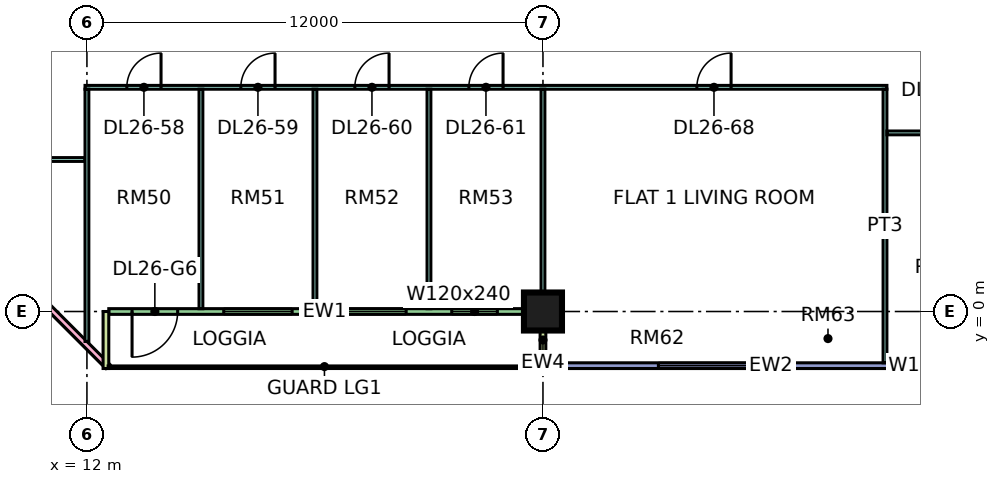
"""IFC4 building model, lengths in metres.
Left out: names, types, materials, properties, quantities, classifications, styles, units other than length and angle.
Written with IfcOpenShell. Run it as: python <this file> out.ifc"""

import sys

from ifc_helpers import new_model, si_unit, direction, frame, frame_2d, origin, origin_2d, place, context, subcontext, project, spatial, rectangle, extrude, element, fill, save


model = new_model("IFC4")
c1 = context("Model", 3, precision=1e-05, world=origin(), true_north=direction((0.0, 1.0)))
c2 = subcontext(c1, "Body", "Model", "MODEL_VIEW")
j1 = project(units=[si_unit("LENGTHUNIT", "METRE"), si_unit("PLANEANGLEUNIT", "RADIAN")], contexts=[c1])
p1 = place(None, origin())
s1 = spatial("IfcSite", under=j1, at=p1, CompositionType="ELEMENT")
p2 = place(p1, origin())
s2 = spatial("IfcBuilding", under=s1, at=p2, CompositionType="ELEMENT")
p3 = place(p2, frame((0.0, 0.0, 114.4)))
s3 = spatial("IfcBuildingStorey", under=s2, at=p3, CompositionType="ELEMENT", Elevation=114.4)
p4 = place(p3, frame((24.0, 0.0, 0.0), z_axis=(0.0, 0.0, 1.0), x_axis=(1.0, 0.0, 0.0)))
e1 = element("IfcColumn", 1, at=p4, inside=s3, PredefinedType="COLUMN", context=c2, shape_type="SweptSolid", body=[
    extrude(rectangle(XDim=1.0, YDim=1.0, at=origin_2d()), origin(), (0.0, 0.0, 1.0), 3.75),
])
p5 = place(p3, frame((-1.447, 12.553, 0.0), z_axis=(0.0, 0.0, 1.0), x_axis=(0.707106781187, -0.707106781187, 0.0)))
e2 = element("IfcWall", 2, at=p5, inside=s3, PredefinedType="SOLIDWALL", context=c2, shape_type="SweptSolid", body=[
    extrude(rectangle(XDim=19.799, YDim=0.15, at=frame_2d((9.899, 0.0))), origin(), (0.0, 0.0, 1.0), 3.35),
])
p6 = place(p5, frame((2.212, 0.0, 0.45)))
e3 = element("IfcOpeningElement", 3, at=p6, cuts=e2, PredefinedType="OPENING", context=c2, shape_type="SweptSolid", body=[
    extrude(rectangle(XDim=3.0, YDim=2.4, at=frame_2d((1.5, 1.2))), frame((0.0, 0.085, 0.0), z_axis=(0.0, -1.0, 0.0), x_axis=(1.0, 0.0, 0.0)), (0.0, 0.0, 1.0), 0.17),
])
p7 = place(p5, frame((10.216, 0.0, 0.45)))
e4 = element("IfcOpeningElement", 4, at=p7, cuts=e2, PredefinedType="OPENING", context=c2, shape_type="SweptSolid", body=[
    extrude(rectangle(XDim=3.0, YDim=2.4, at=frame_2d((1.5, 1.2))), frame((0.0, 0.085, 0.0), z_axis=(0.0, -1.0, 0.0), x_axis=(1.0, 0.0, 0.0)), (0.0, 0.0, 1.0), 0.17),
])
p8 = place(p3, frame((12.575, 0.0, 0.0), z_axis=(0.0, 0.0, 1.0), x_axis=(1.0, 0.0, 0.0)))
e5 = element("IfcWall", 5, at=p8, inside=s3, PredefinedType="SOLIDWALL", context=c2, shape_type="SweptSolid", body=[
    extrude(rectangle(XDim=11.35, YDim=0.15, at=frame_2d((5.675, 0.0))), origin(), (0.0, 0.0, 1.0), 3.35),
])
p9 = place(p8, frame((0.613, 0.0, 0.0)))
e6 = element("IfcOpeningElement", 6, at=p9, cuts=e5, PredefinedType="OPENING", context=c2, shape_type="SweptSolid", body=[
    extrude(rectangle(XDim=1.2, YDim=2.4, at=frame_2d((0.6, 1.2))), frame((0.0, 0.085, 0.0), z_axis=(0.0, -1.0, 0.0), x_axis=(1.0, 0.0, 0.0)), (0.0, 0.0, 1.0), 0.17),
])
p10 = place(p8, frame((3.025, 0.0, 0.45)))
e7 = element("IfcOpeningElement", 7, at=p10, cuts=e5, PredefinedType="OPENING", context=c2, shape_type="SweptSolid", body=[
    extrude(rectangle(XDim=1.8, YDim=2.4, at=frame_2d((0.9, 1.2))), frame((0.0, 0.085, 0.0), z_axis=(0.0, -1.0, 0.0), x_axis=(1.0, 0.0, 0.0)), (0.0, 0.0, 1.0), 0.17),
])
p11 = place(p8, frame((6.025, 0.0, 0.45)))
e8 = element("IfcOpeningElement", 8, at=p11, cuts=e5, PredefinedType="OPENING", context=c2, shape_type="SweptSolid", body=[
    extrude(rectangle(XDim=1.8, YDim=2.4, at=frame_2d((0.9, 1.2))), frame((0.0, 0.085, 0.0), z_axis=(0.0, -1.0, 0.0), x_axis=(1.0, 0.0, 0.0)), (0.0, 0.0, 1.0), 0.17),
])
p12 = place(p8, frame((9.025, 0.0, 0.45)))
e9 = element("IfcOpeningElement", 9, at=p12, cuts=e5, PredefinedType="OPENING", context=c2, shape_type="SweptSolid", body=[
    extrude(rectangle(XDim=1.2, YDim=2.4, at=frame_2d((0.6, 1.2))), frame((0.0, 0.085, 0.0), z_axis=(0.0, -1.0, 0.0), x_axis=(1.0, 0.0, 0.0)), (0.0, 0.0, 1.0), 0.17),
])
for number, where, z_axis, x_axis in (
    (10, (12.5, -1.5, 0.0), (0.0, 0.0, 1.0), (0.0, 1.0, 0.0)),
    (11, (24.0, -1.5, 0.0), (0.0, 0.0, 1.0), (0.0, 1.0, 0.0)),
):
    element("IfcWall", number, at=place(p3, frame(where, z_axis=z_axis, x_axis=x_axis)), inside=s3, PredefinedType="SOLIDWALL", context=c2, shape_type="SweptSolid", body=[
        extrude(rectangle(XDim=1.5, YDim=0.15, at=frame_2d((0.75, 0.0))), origin(), (0.0, 0.0, 1.0), 3.35),
    ])
p13 = place(p3, frame((24.075, -1.425, 0.0), z_axis=(0.0, 0.0, 1.0), x_axis=(1.0, 0.0, 0.0)))
e12 = element("IfcWall", 12, at=p13, inside=s3, PredefinedType="SOLIDWALL", context=c2, shape_type="SweptSolid", body=[
    extrude(rectangle(XDim=11.85, YDim=0.15, at=frame_2d((5.925, 0.0))), origin(), (0.0, 0.0, 1.0), 3.35),
])
p14 = place(p13, frame((2.962, 0.0, 0.45)))
e13 = element("IfcOpeningElement", 13, at=p14, cuts=e12, PredefinedType="OPENING", context=c2, shape_type="SweptSolid", body=[
    extrude(rectangle(XDim=3.0, YDim=2.4, at=frame_2d((1.5, 1.2))), frame((0.0, 0.085, 0.0), z_axis=(0.0, -1.0, 0.0), x_axis=(1.0, 0.0, 0.0)), (0.0, 0.0, 1.0), 0.17),
])
p15 = place(p13, frame((9.488, 0.0, 0.45)))
e14 = element("IfcOpeningElement", 14, at=p15, cuts=e12, PredefinedType="OPENING", context=c2, shape_type="SweptSolid", body=[
    extrude(rectangle(XDim=1.8, YDim=2.4, at=frame_2d((0.9, 1.2))), frame((0.0, 0.085, 0.0), z_axis=(0.0, -1.0, 0.0), x_axis=(1.0, 0.0, 0.0)), (0.0, 0.0, 1.0), 0.17),
])
p16 = place(p3, frame((9.05, 4.0, 0.0), z_axis=(0.0, 0.0, 1.0), x_axis=(1.0, 0.0, 0.0)))
e15 = element("IfcWall", 15, at=p16, inside=s3, PredefinedType="PARTITIONING", context=c2, shape_type="SweptSolid", body=[
    extrude(rectangle(XDim=2.9, YDim=0.1, at=frame_2d((1.45, 0.0))), origin(), (0.0, 0.0, 1.0), 3.35),
])
p17 = place(p3, frame((11.95, 5.9, 0.0), z_axis=(0.0, 0.0, 1.0), x_axis=(1.0, 0.0, 0.0)))
e16 = element("IfcWall", 16, at=p17, inside=s3, PredefinedType="PARTITIONING", context=c2, shape_type="SweptSolid", body=[
    extrude(rectangle(XDim=21.1, YDim=0.1, at=frame_2d((10.55, 0.0))), origin(), (0.0, 0.0, 1.0), 3.35),
])
p18 = place(p17, frame((1.1, 0.0, 0.0)))
e17 = element("IfcOpeningElement", 17, at=p18, cuts=e16, PredefinedType="OPENING", context=c2, shape_type="SweptSolid", body=[
    extrude(rectangle(XDim=0.9, YDim=2.1, at=frame_2d((0.45, 1.05))), frame((0.0, 0.06, 0.0), z_axis=(0.0, -1.0, 0.0), x_axis=(1.0, 0.0, 0.0)), (0.0, 0.0, 1.0), 0.12),
])
p19 = place(p17, frame((4.1, 0.0, 0.0)))
e18 = element("IfcOpeningElement", 18, at=p19, cuts=e16, PredefinedType="OPENING", context=c2, shape_type="SweptSolid", body=[
    extrude(rectangle(XDim=0.9, YDim=2.1, at=frame_2d((0.45, 1.05))), frame((0.0, 0.06, 0.0), z_axis=(0.0, -1.0, 0.0), x_axis=(1.0, 0.0, 0.0)), (0.0, 0.0, 1.0), 0.12),
])
p20 = place(p17, frame((7.1, 0.0, 0.0)))
e19 = element("IfcOpeningElement", 19, at=p20, cuts=e16, PredefinedType="OPENING", context=c2, shape_type="SweptSolid", body=[
    extrude(rectangle(XDim=0.9, YDim=2.1, at=frame_2d((0.45, 1.05))), frame((0.0, 0.06, 0.0), z_axis=(0.0, -1.0, 0.0), x_axis=(1.0, 0.0, 0.0)), (0.0, 0.0, 1.0), 0.12),
])
p21 = place(p17, frame((10.1, 0.0, 0.0)))
e20 = element("IfcOpeningElement", 20, at=p21, cuts=e16, PredefinedType="OPENING", context=c2, shape_type="SweptSolid", body=[
    extrude(rectangle(XDim=0.9, YDim=2.1, at=frame_2d((0.45, 1.05))), frame((0.0, 0.06, 0.0), z_axis=(0.0, -1.0, 0.0), x_axis=(1.0, 0.0, 0.0)), (0.0, 0.0, 1.0), 0.12),
])
p22 = place(p17, frame((16.1, 0.0, 0.0)))
e21 = element("IfcOpeningElement", 21, at=p22, cuts=e16, PredefinedType="OPENING", context=c2, shape_type="SweptSolid", body=[
    extrude(rectangle(XDim=0.9, YDim=2.1, at=frame_2d((0.45, 1.05))), frame((0.0, 0.06, 0.0), z_axis=(0.0, -1.0, 0.0), x_axis=(1.0, 0.0, 0.0)), (0.0, 0.0, 1.0), 0.12),
])
p23 = place(p3, frame((12.0, -0.788, 0.0), z_axis=(0.0, 0.0, 1.0), x_axis=(0.0, 1.0, 0.0)))
e22 = element("IfcWall", 22, at=p23, inside=s3, PredefinedType="PARTITIONING", context=c2, shape_type="SweptSolid", body=[
    extrude(rectangle(XDim=6.638, YDim=0.1, at=frame_2d((3.319, 0.0))), origin(), (0.0, 0.0, 1.0), 3.35),
])
for number, where, z_axis, x_axis in (
    (23, (15.0, 0.074, 0.0), (0.0, 0.0, 1.0), (0.0, 1.0, 0.0)),
    (24, (18.0, 0.074, 0.0), (0.0, 0.0, 1.0), (0.0, 1.0, 0.0)),
    (25, (21.0, 0.074, 0.0), (0.0, 0.0, 1.0), (0.0, 1.0, 0.0)),
):
    element("IfcWall", number, at=place(p3, frame(where, z_axis=z_axis, x_axis=x_axis)), inside=s3, PredefinedType="PARTITIONING", context=c2, shape_type="SweptSolid", body=[
        extrude(rectangle(XDim=5.776, YDim=0.1, at=frame_2d((2.888, 0.0))), origin(), (0.0, 0.0, 1.0), 3.35),
    ])
p24 = place(p3, frame((24.0, 0.0, 0.0), z_axis=(0.0, 0.0, 1.0), x_axis=(0.0, 1.0, 0.0)))
e26 = element("IfcWall", 26, at=p24, inside=s3, PredefinedType="PARTITIONING", context=c2, shape_type="SweptSolid", body=[
    extrude(rectangle(XDim=5.85, YDim=0.1, at=frame_2d((2.925, 0.0))), origin(), (0.0, 0.0, 1.0), 3.35),
])
p25 = place(p3, frame((33.0, -1.35, 0.0), z_axis=(0.0, 0.0, 1.0), x_axis=(0.0, 1.0, 0.0)))
e27 = element("IfcWall", 27, at=p25, inside=s3, PredefinedType="PARTITIONING", context=c2, shape_type="SweptSolid", body=[
    extrude(rectangle(XDim=7.2, YDim=0.1, at=frame_2d((3.6, 0.0))), origin(), (0.0, 0.0, 1.0), 3.35),
])
p26 = place(p3, frame((33.05, 4.7, 0.0), z_axis=(0.0, 0.0, 1.0), x_axis=(1.0, 0.0, 0.0)))
e28 = element("IfcWall", 28, at=p26, inside=s3, PredefinedType="PARTITIONING", context=c2, shape_type="SweptSolid", body=[
    extrude(rectangle(XDim=14.85, YDim=0.1, at=frame_2d((7.425, 0.0))), origin(), (0.0, 0.0, 1.0), 3.35),
])
p27 = place(p26, frame((1.0, 0.0, 0.0)))
e29 = element("IfcOpeningElement", 29, at=p27, cuts=e28, PredefinedType="OPENING", context=c2, shape_type="SweptSolid", body=[
    extrude(rectangle(XDim=0.9, YDim=2.1, at=frame_2d((0.45, 1.05))), frame((0.0, 0.06, 0.0), z_axis=(0.0, -1.0, 0.0), x_axis=(1.0, 0.0, 0.0)), (0.0, 0.0, 1.0), 0.12),
])
p28 = place(p26, frame((13.0, 0.0, 0.0)))
e30 = element("IfcOpeningElement", 30, at=p28, cuts=e28, PredefinedType="OPENING", context=c2, shape_type="SweptSolid", body=[
    extrude(rectangle(XDim=0.9, YDim=2.1, at=frame_2d((0.45, 1.05))), frame((0.0, 0.06, 0.0), z_axis=(0.0, -1.0, 0.0), x_axis=(1.0, 0.0, 0.0)), (0.0, 0.0, 1.0), 0.12),
])
p29 = place(p26, frame((7.0, 0.0, 0.0)))
e31 = element("IfcOpeningElement", 31, at=p29, cuts=e28, PredefinedType="OPENING", context=c2, shape_type="SweptSolid", body=[
    extrude(rectangle(XDim=0.9, YDim=2.1, at=frame_2d((0.45, 1.05))), frame((0.0, 0.06, 0.0), z_axis=(0.0, -1.0, 0.0), x_axis=(1.0, 0.0, 0.0)), (0.0, 0.0, 1.0), 0.12),
])
p30 = place(p9, frame((1.2, 0.0, 0.0), z_axis=(0.0, 0.0, 1.0), x_axis=(-1.0, 0.0, 0.0)))
e32 = element("IfcDoor", 32, at=p30, inside=s3, OperationType="DOUBLE_DOOR_SINGLE_SWING", PredefinedType="DOOR", context=c2, shape_type="SweptSolid", body=[
    extrude(rectangle(XDim=1.2, YDim=2.4, at=frame_2d((0.6, 1.2))), frame((0.0, 0.025, 0.0), z_axis=(0.0, -1.0, 0.0), x_axis=(1.0, 0.0, 0.0)), (0.0, 0.0, 1.0), 0.05),
])
fill(e6, e32)
p31 = place(p10, origin())
e33 = element("IfcWindow", 33, at=p31, inside=s3, PartitioningType="SINGLE_PANEL", PredefinedType="WINDOW", context=c2, shape_type="SweptSolid", body=[
    extrude(rectangle(XDim=1.8, YDim=2.4, at=frame_2d((0.9, 1.2))), frame((0.0, 0.03, 0.0), z_axis=(0.0, -1.0, 0.0), x_axis=(1.0, 0.0, 0.0)), (0.0, 0.0, 1.0), 0.06),
])
fill(e7, e33)
p32 = place(p11, origin())
e34 = element("IfcWindow", 34, at=p32, inside=s3, PartitioningType="SINGLE_PANEL", PredefinedType="WINDOW", context=c2, shape_type="SweptSolid", body=[
    extrude(rectangle(XDim=1.8, YDim=2.4, at=frame_2d((0.9, 1.2))), frame((0.0, 0.03, 0.0), z_axis=(0.0, -1.0, 0.0), x_axis=(1.0, 0.0, 0.0)), (0.0, 0.0, 1.0), 0.06),
])
fill(e8, e34)
p33 = place(p12, origin())
e35 = element("IfcWindow", 35, at=p33, inside=s3, PartitioningType="SINGLE_PANEL", PredefinedType="WINDOW", context=c2, shape_type="SweptSolid", body=[
    extrude(rectangle(XDim=1.2, YDim=2.4, at=frame_2d((0.6, 1.2))), frame((0.0, 0.03, 0.0), z_axis=(0.0, -1.0, 0.0), x_axis=(1.0, 0.0, 0.0)), (0.0, 0.0, 1.0), 0.06),
])
fill(e9, e35)
p34 = place(p14, origin())
e36 = element("IfcWindow", 36, at=p34, inside=s3, PartitioningType="SINGLE_PANEL", PredefinedType="WINDOW", context=c2, shape_type="SweptSolid", body=[
    extrude(rectangle(XDim=3.0, YDim=2.4, at=frame_2d((1.5, 1.2))), frame((0.0, 0.03, 0.0), z_axis=(0.0, -1.0, 0.0), x_axis=(1.0, 0.0, 0.0)), (0.0, 0.0, 1.0), 0.06),
])
fill(e13, e36)
p35 = place(p15, origin())
e37 = element("IfcWindow", 37, at=p35, inside=s3, PartitioningType="SINGLE_PANEL", PredefinedType="WINDOW", context=c2, shape_type="SweptSolid", body=[
    extrude(rectangle(XDim=1.8, YDim=2.4, at=frame_2d((0.9, 1.2))), frame((0.0, 0.03, 0.0), z_axis=(0.0, -1.0, 0.0), x_axis=(1.0, 0.0, 0.0)), (0.0, 0.0, 1.0), 0.06),
])
fill(e14, e37)
p36 = place(p18, frame((0.9, 0.0, 0.0), z_axis=(0.0, 0.0, 1.0), x_axis=(-1.0, 0.0, 0.0)))
e38 = element("IfcDoor", 38, at=p36, inside=s3, OperationType="SINGLE_SWING_RIGHT", PredefinedType="DOOR", context=c2, shape_type="SweptSolid", body=[
    extrude(rectangle(XDim=0.9, YDim=2.1, at=frame_2d((0.45, 1.05))), frame((0.0, 0.025, 0.0), z_axis=(0.0, -1.0, 0.0), x_axis=(1.0, 0.0, 0.0)), (0.0, 0.0, 1.0), 0.05),
])
fill(e17, e38)
p37 = place(p19, frame((0.9, 0.0, 0.0), z_axis=(0.0, 0.0, 1.0), x_axis=(-1.0, 0.0, 0.0)))
e39 = element("IfcDoor", 39, at=p37, inside=s3, OperationType="SINGLE_SWING_RIGHT", PredefinedType="DOOR", context=c2, shape_type="SweptSolid", body=[
    extrude(rectangle(XDim=0.9, YDim=2.1, at=frame_2d((0.45, 1.05))), frame((0.0, 0.025, 0.0), z_axis=(0.0, -1.0, 0.0), x_axis=(1.0, 0.0, 0.0)), (0.0, 0.0, 1.0), 0.05),
])
fill(e18, e39)
p38 = place(p20, frame((0.9, 0.0, 0.0), z_axis=(0.0, 0.0, 1.0), x_axis=(-1.0, 0.0, 0.0)))
e40 = element("IfcDoor", 40, at=p38, inside=s3, OperationType="SINGLE_SWING_RIGHT", PredefinedType="DOOR", context=c2, shape_type="SweptSolid", body=[
    extrude(rectangle(XDim=0.9, YDim=2.1, at=frame_2d((0.45, 1.05))), frame((0.0, 0.025, 0.0), z_axis=(0.0, -1.0, 0.0), x_axis=(1.0, 0.0, 0.0)), (0.0, 0.0, 1.0), 0.05),
])
fill(e19, e40)
p39 = place(p21, frame((0.9, 0.0, 0.0), z_axis=(0.0, 0.0, 1.0), x_axis=(-1.0, 0.0, 0.0)))
e41 = element("IfcDoor", 41, at=p39, inside=s3, OperationType="SINGLE_SWING_RIGHT", PredefinedType="DOOR", context=c2, shape_type="SweptSolid", body=[
    extrude(rectangle(XDim=0.9, YDim=2.1, at=frame_2d((0.45, 1.05))), frame((0.0, 0.025, 0.0), z_axis=(0.0, -1.0, 0.0), x_axis=(1.0, 0.0, 0.0)), (0.0, 0.0, 1.0), 0.05),
])
fill(e20, e41)
p40 = place(p22, frame((0.9, 0.0, 0.0), z_axis=(0.0, 0.0, 1.0), x_axis=(-1.0, 0.0, 0.0)))
e42 = element("IfcDoor", 42, at=p40, inside=s3, OperationType="SINGLE_SWING_RIGHT", PredefinedType="DOOR", context=c2, shape_type="SweptSolid", body=[
    extrude(rectangle(XDim=0.9, YDim=2.1, at=frame_2d((0.45, 1.05))), frame((0.0, 0.025, 0.0), z_axis=(0.0, -1.0, 0.0), x_axis=(1.0, 0.0, 0.0)), (0.0, 0.0, 1.0), 0.05),
])
fill(e21, e42)
save(model, sys.argv[1])
